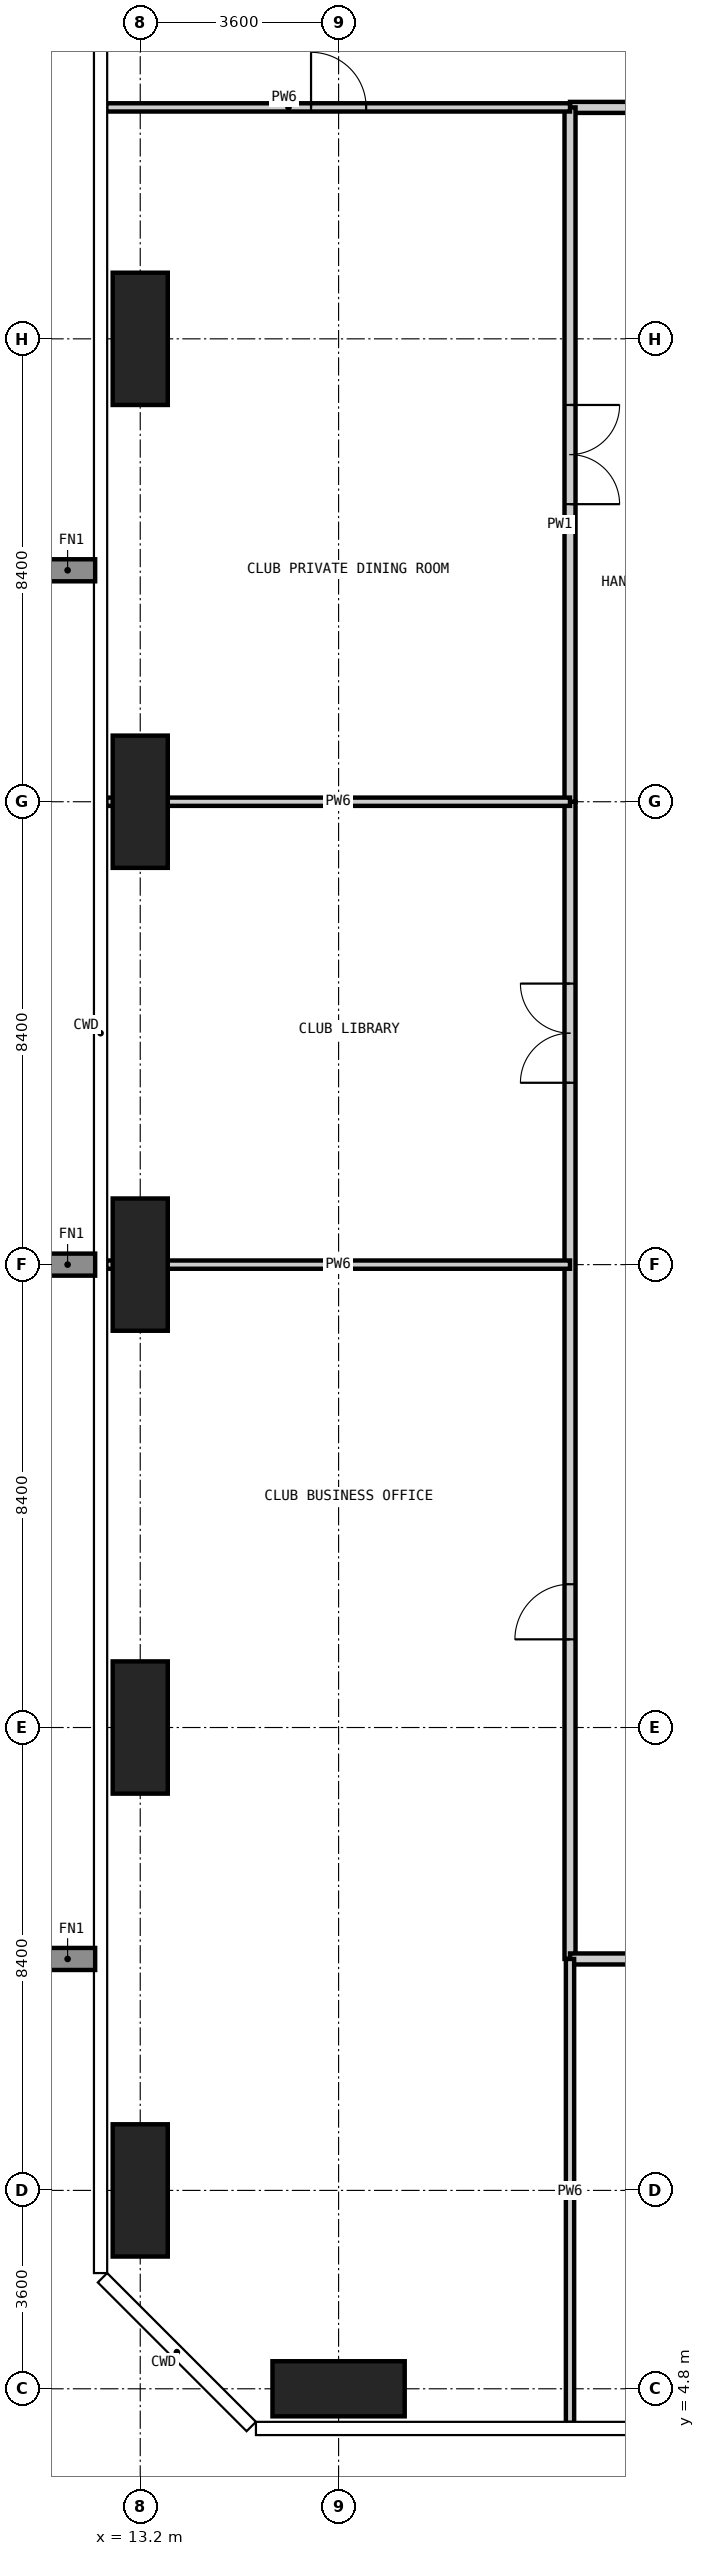
"""IFC4 building model, lengths in metres.
Left out: names, types, materials, properties, quantities, classifications, styles, units other than length and angle.
Written with IfcOpenShell. Run it as: python <this file> out.ifc"""

import sys

from ifc_helpers import new_model, si_unit, direction, frame, frame_2d, origin, origin_2d, place, context, subcontext, project, spatial, rectangle, extrude, element, fill, save


model = new_model("IFC4")
c1 = context("Model", 3, precision=1e-05, world=origin(), true_north=direction((0.0, 1.0)))
c2 = subcontext(c1, "Body", "Model", "MODEL_VIEW")
j1 = project(units=[si_unit("LENGTHUNIT", "METRE"), si_unit("PLANEANGLEUNIT", "RADIAN")], contexts=[c1])
p1 = place(None, origin())
s1 = spatial("IfcSite", under=j1, at=p1, CompositionType="ELEMENT")
p2 = place(p1, origin())
s2 = spatial("IfcBuilding", under=s1, at=p2, CompositionType="ELEMENT")
p3 = place(p2, frame((0.0, 0.0, 284.1)))
s3 = spatial("IfcBuildingStorey", under=s2, at=p3, CompositionType="ELEMENT", Elevation=284.1)
for number, where, z_axis, x_axis in (
    (1, (13.2, 8.4, -0.35), (0.0, 0.0, 1.0), (1.0, 0.0, 0.0)),
    (2, (13.2, 16.8, -0.35), (0.0, 0.0, 1.0), (1.0, 0.0, 0.0)),
    (3, (13.2, 25.2, -0.35), (0.0, 0.0, 1.0), (1.0, 0.0, 0.0)),
    (4, (13.2, 33.6, -0.35), (0.0, 0.0, 1.0), (1.0, 0.0, 0.0)),
    (5, (13.2, 42.0, -0.35), (0.0, 0.0, 1.0), (1.0, 0.0, 0.0)),
):
    element("IfcColumn", number, at=place(p3, frame(where, z_axis=z_axis, x_axis=x_axis)), inside=s3, PredefinedType="COLUMN", context=c2, shape_type="SweptSolid", body=[
        extrude(rectangle(XDim=1.0, YDim=2.4, at=origin_2d()), origin(), (0.0, 0.0, 1.0), 5.0),
    ])
p4 = place(p3, frame((16.8, 4.8, -0.35), z_axis=(0.0, 0.0, 1.0), x_axis=(1.0, 0.0, 0.0)))
e6 = element("IfcColumn", 6, at=p4, inside=s3, PredefinedType="COLUMN", context=c2, shape_type="SweptSolid", body=[
    extrude(rectangle(XDim=2.4, YDim=1.0, at=origin_2d()), origin(), (0.0, 0.0, 1.0), 5.0),
])
p5 = place(p3, frame((21.0, 12.6, 0.0), z_axis=(0.0, 0.0, 1.0), x_axis=(0.0, 1.0, 0.0)))
e7 = element("IfcWall", 7, at=p5, inside=s3, PredefinedType="PARTITIONING", context=c2, shape_type="SweptSolid", body=[
    extrude(rectangle(XDim=21.0, YDim=0.2, at=frame_2d((10.5, 0.0))), origin(), (0.0, 0.0, 1.0), 4.65),
])
p6 = place(p5, frame((15.9, 0.0, 0.0)))
e8 = element("IfcOpeningElement", 8, at=p6, cuts=e7, PredefinedType="OPENING", context=c2, shape_type="SweptSolid", body=[
    extrude(rectangle(XDim=1.8, YDim=2.4, at=frame_2d((0.9, 1.2))), frame((0.0, 0.11, 0.0), z_axis=(0.0, -1.0, 0.0), x_axis=(1.0, 0.0, 0.0)), (0.0, 0.0, 1.0), 0.22),
])
p7 = place(p5, frame((5.8, 0.0, 0.0)))
e9 = element("IfcOpeningElement", 9, at=p7, cuts=e7, PredefinedType="OPENING", context=c2, shape_type="SweptSolid", body=[
    extrude(rectangle(XDim=1.0, YDim=2.1, at=frame_2d((0.5, 1.05))), frame((0.0, 0.11, 0.0), z_axis=(0.0, -1.0, 0.0), x_axis=(1.0, 0.0, 0.0)), (0.0, 0.0, 1.0), 0.22),
])
p8 = place(p3, frame((21.0, 12.6, 0.0), z_axis=(0.0, 0.0, 1.0), x_axis=(1.0, 0.0, 0.0)))
e10 = element("IfcWall", 10, at=p8, inside=s3, PredefinedType="PARTITIONING", context=c2, shape_type="SweptSolid", body=[
    extrude(rectangle(XDim=25.2, YDim=0.2, at=frame_2d((12.6, 0.0))), origin(), (0.0, 0.0, 1.0), 4.65),
])
p9 = place(p8, frame((5.4, 0.0, 0.0)))
e11 = element("IfcOpeningElement", 11, at=p9, cuts=e10, PredefinedType="OPENING", context=c2, shape_type="SweptSolid", body=[
    extrude(rectangle(XDim=1.8, YDim=2.4, at=frame_2d((0.9, 1.2))), frame((0.0, 0.11, 0.0), z_axis=(0.0, -1.0, 0.0), x_axis=(1.0, 0.0, 0.0)), (0.0, 0.0, 1.0), 0.22),
])
p10 = place(p8, frame((18.4, 0.0, 0.0)))
e12 = element("IfcOpeningElement", 12, at=p10, cuts=e10, PredefinedType="OPENING", context=c2, shape_type="SweptSolid", body=[
    extrude(rectangle(XDim=1.0, YDim=2.1, at=frame_2d((0.5, 1.05))), frame((0.0, 0.11, 0.0), z_axis=(0.0, -1.0, 0.0), x_axis=(1.0, 0.0, 0.0)), (0.0, 0.0, 1.0), 0.22),
])
p11 = place(p3, frame((21.0, 46.2, 0.0), z_axis=(0.0, 0.0, 1.0), x_axis=(1.0, 0.0, 0.0)))
e13 = element("IfcWall", 13, at=p11, inside=s3, PredefinedType="PARTITIONING", context=c2, shape_type="SweptSolid", body=[
    extrude(rectangle(XDim=13.8, YDim=0.2, at=frame_2d((6.9, 0.0))), origin(), (0.0, 0.0, 1.0), 4.65),
])
p12 = place(p11, frame((1.6, 0.0, 0.0)))
e14 = element("IfcOpeningElement", 14, at=p12, cuts=e13, PredefinedType="OPENING", context=c2, shape_type="SweptSolid", body=[
    extrude(rectangle(XDim=1.0, YDim=2.1, at=frame_2d((0.5, 1.05))), frame((0.0, 0.11, 0.0), z_axis=(0.0, -1.0, 0.0), x_axis=(1.0, 0.0, 0.0)), (0.0, 0.0, 1.0), 0.22),
])
p13 = place(p11, frame((5.55, 0.0, 0.0)))
e15 = element("IfcOpeningElement", 15, at=p13, cuts=e13, PredefinedType="OPENING", context=c2, shape_type="SweptSolid", body=[
    extrude(rectangle(XDim=0.9, YDim=2.1, at=frame_2d((0.45, 1.05))), frame((0.0, 0.11, 0.0), z_axis=(0.0, -1.0, 0.0), x_axis=(1.0, 0.0, 0.0)), (0.0, 0.0, 1.0), 0.22),
])
p14 = place(p11, frame((9.15, 0.0, 0.0)))
e16 = element("IfcOpeningElement", 16, at=p14, cuts=e13, PredefinedType="OPENING", context=c2, shape_type="SweptSolid", body=[
    extrude(rectangle(XDim=0.9, YDim=2.1, at=frame_2d((0.45, 1.05))), frame((0.0, 0.11, 0.0), z_axis=(0.0, -1.0, 0.0), x_axis=(1.0, 0.0, 0.0)), (0.0, 0.0, 1.0), 0.22),
])
p15 = place(p11, frame((12.1, 0.0, 0.0)))
e17 = element("IfcOpeningElement", 17, at=p15, cuts=e13, PredefinedType="OPENING", context=c2, shape_type="SweptSolid", body=[
    extrude(rectangle(XDim=1.0, YDim=2.1, at=frame_2d((0.5, 1.05))), frame((0.0, 0.11, 0.0), z_axis=(0.0, -1.0, 0.0), x_axis=(1.0, 0.0, 0.0)), (0.0, 0.0, 1.0), 0.22),
])
p16 = place(p3, frame((21.0, 46.2, 0.0), z_axis=(0.0, 0.0, 1.0), x_axis=(0.0, -1.0, 0.0)))
e18 = element("IfcWall", 18, at=p16, inside=s3, PredefinedType="PARTITIONING", context=c2, shape_type="SweptSolid", body=[
    extrude(rectangle(XDim=12.6, YDim=0.2, at=frame_2d((6.3, 0.0))), origin(), (0.0, 0.0, 1.0), 4.65),
])
p17 = place(p16, frame((5.4, 0.0, 0.0)))
e19 = element("IfcOpeningElement", 19, at=p17, cuts=e18, PredefinedType="OPENING", context=c2, shape_type="SweptSolid", body=[
    extrude(rectangle(XDim=1.8, YDim=2.4, at=frame_2d((0.9, 1.2))), frame((0.0, 0.11, 0.0), z_axis=(0.0, -1.0, 0.0), x_axis=(1.0, 0.0, 0.0)), (0.0, 0.0, 1.0), 0.22),
])
p18 = place(p3, frame((21.0, 4.182, 0.0), z_axis=(0.0, 0.0, 1.0), x_axis=(0.0, 1.0, 0.0)))
e20 = element("IfcWall", 20, at=p18, inside=s3, PredefinedType="PARTITIONING", context=c2, shape_type="SweptSolid", body=[
    extrude(rectangle(XDim=8.418, YDim=0.15, at=frame_2d((4.209, 0.0))), origin(), (0.0, 0.0, 1.0), 4.65),
])
for number, where, z_axis, x_axis in (
    (21, (12.582, 25.2, 0.0), (0.0, 0.0, 1.0), (1.0, 0.0, 0.0)),
    (22, (12.582, 33.6, 0.0), (0.0, 0.0, 1.0), (1.0, 0.0, 0.0)),
):
    element("IfcWall", number, at=place(p3, frame(where, z_axis=z_axis, x_axis=x_axis)), inside=s3, PredefinedType="PARTITIONING", context=c2, shape_type="SweptSolid", body=[
        extrude(rectangle(XDim=8.418, YDim=0.15, at=frame_2d((4.209, 0.0))), origin(), (0.0, 0.0, 1.0), 4.65),
    ])
p19 = place(p3, frame((12.582, 46.2, 0.0), z_axis=(0.0, 0.0, 1.0), x_axis=(1.0, 0.0, 0.0)))
e23 = element("IfcWall", 23, at=p19, inside=s3, PredefinedType="PARTITIONING", context=c2, shape_type="SweptSolid", body=[
    extrude(rectangle(XDim=8.418, YDim=0.15, at=frame_2d((4.209, 0.0))), origin(), (0.0, 0.0, 1.0), 4.65),
])
p20 = place(p19, frame((3.718, 0.0, 0.0)))
e24 = element("IfcOpeningElement", 24, at=p20, cuts=e23, PredefinedType="OPENING", context=c2, shape_type="SweptSolid", body=[
    extrude(rectangle(XDim=1.0, YDim=2.1, at=frame_2d((0.5, 1.05))), frame((0.0, 0.085, 0.0), z_axis=(0.0, -1.0, 0.0), x_axis=(1.0, 0.0, 0.0)), (0.0, 0.0, 1.0), 0.17),
])
p21 = place(p20, origin())
e25 = element("IfcDoor", 25, at=p21, inside=s3, OperationType="SINGLE_SWING_LEFT", PredefinedType="DOOR", context=c2, shape_type="SweptSolid", body=[
    extrude(rectangle(XDim=1.0, YDim=2.1, at=frame_2d((0.5, 1.05))), frame((0.0, 0.025, 0.0), z_axis=(0.0, -1.0, 0.0), x_axis=(1.0, 0.0, 0.0)), (0.0, 0.0, 1.0), 0.05),
])
fill(e24, e25)
p22 = place(p17, origin())
e26 = element("IfcDoor", 26, at=p22, inside=s3, OperationType="DOUBLE_DOOR_DOUBLE_SWING", PredefinedType="DOOR", context=c2, shape_type="SweptSolid", body=[
    extrude(rectangle(XDim=1.8, YDim=2.4, at=frame_2d((0.9, 1.2))), frame((0.0, 0.025, 0.0), z_axis=(0.0, -1.0, 0.0), x_axis=(1.0, 0.0, 0.0)), (0.0, 0.0, 1.0), 0.05),
])
fill(e19, e26)
p23 = place(p6, origin())
e27 = element("IfcDoor", 27, at=p23, inside=s3, OperationType="DOUBLE_DOOR_DOUBLE_SWING", PredefinedType="DOOR", context=c2, shape_type="SweptSolid", body=[
    extrude(rectangle(XDim=1.8, YDim=2.4, at=frame_2d((0.9, 1.2))), frame((0.0, 0.025, 0.0), z_axis=(0.0, -1.0, 0.0), x_axis=(1.0, 0.0, 0.0)), (0.0, 0.0, 1.0), 0.05),
])
fill(e8, e27)
p24 = place(p7, origin())
e28 = element("IfcDoor", 28, at=p24, inside=s3, OperationType="SINGLE_SWING_LEFT", PredefinedType="DOOR", context=c2, shape_type="SweptSolid", body=[
    extrude(rectangle(XDim=1.0, YDim=2.1, at=frame_2d((0.5, 1.05))), frame((0.0, 0.025, 0.0), z_axis=(0.0, -1.0, 0.0), x_axis=(1.0, 0.0, 0.0)), (0.0, 0.0, 1.0), 0.05),
])
fill(e9, e28)
save(model, sys.argv[1])
